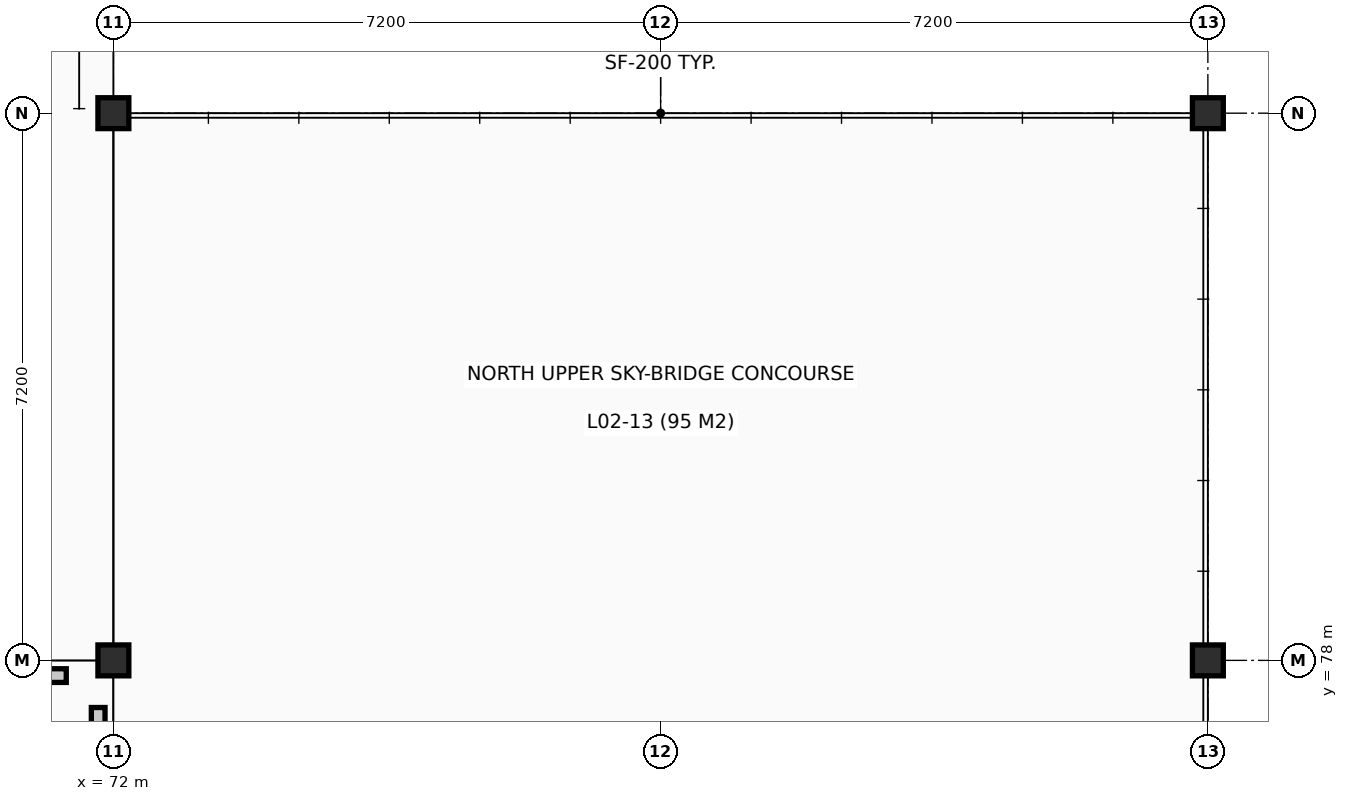
"""IFC4 building model, lengths in metres.
Left out: names, types, materials, properties, quantities, classifications, styles, units other than length and angle.
Written with IfcOpenShell. Run it as: python <this file> out.ifc"""

import sys

from ifc_helpers import new_model, si_unit, direction, frame, frame_2d, origin, origin_2d, place, context, subcontext, project, spatial, rectangle, hollow_circle, extrude, element, save


model = new_model("IFC4")
c1 = context("Model", 3, precision=1e-05, world=origin(), true_north=direction((0.0, 1.0)))
c2 = subcontext(c1, "Body", "Model", "MODEL_VIEW")
j1 = project(units=[si_unit("LENGTHUNIT", "METRE"), si_unit("PLANEANGLEUNIT", "RADIAN")], contexts=[c1])
p1 = place(None, origin())
s1 = spatial("IfcSite", under=j1, at=p1, CompositionType="ELEMENT")
p2 = place(p1, origin())
s2 = spatial("IfcBuilding", under=s1, at=p2, CompositionType="ELEMENT")
p3 = place(p2, frame((0.0, 0.0, 9.6)))
s3 = spatial("IfcBuildingStorey", under=s2, at=p3, CompositionType="ELEMENT", Elevation=9.6)
for number, where, z_axis, x_axis in (
    (1, (72.0, 78.0, 0.0), (0.0, 0.0, 1.0), (1.0, 0.0, 0.0)),
    (2, (72.0, 85.2, 0.0), (0.0, 0.0, 1.0), (1.0, 0.0, 0.0)),
    (3, (86.4, 78.0, 0.0), (0.0, 0.0, 1.0), (1.0, 0.0, 0.0)),
    (4, (86.4, 85.2, 0.0), (0.0, 0.0, 1.0), (1.0, 0.0, 0.0)),
):
    element("IfcColumn", number, at=place(p3, frame(where, z_axis=z_axis, x_axis=x_axis)), inside=s3, PredefinedType="COLUMN", context=c2, shape_type="SweptSolid", body=[
        extrude(hollow_circle(Radius=0.203, WallThickness=0.016, at=origin_2d()), origin(), (0.0, 0.0, 1.0), 4.8),
    ])
p4 = place(p3, frame((58.02, 77.8, 0.0), z_axis=(0.0, 0.0, 1.0), x_axis=(1.0, 0.0, 0.0)))
e5 = element("IfcWall", 5, at=p4, inside=s3, PredefinedType="PARTITIONING", context=c2, shape_type="SweptSolid", body=[
    extrude(rectangle(XDim=13.36, YDim=0.18, at=frame_2d((6.68, 0.0))), origin(), (0.0, 0.0, 1.0), 4.04),
])
p5 = place(p4, frame((7.955, 0.0, 0.0)))
e6 = element("IfcOpeningElement", 6, at=p5, cuts=e5, PredefinedType="OPENING", context=c2, shape_type="SweptSolid", body=[
    extrude(rectangle(XDim=1.25, YDim=2.15, at=frame_2d((0.625, 1.075))), frame((0.0, 0.1, 0.0), z_axis=(0.0, -1.0, 0.0), x_axis=(1.0, 0.0, 0.0)), (0.0, 0.0, 1.0), 0.2),
])
p6 = place(p3, frame((71.8, 57.42, 0.0), z_axis=(0.0, 0.0, 1.0), x_axis=(0.0, 1.0, 0.0)))
e7 = element("IfcWall", 7, at=p6, inside=s3, PredefinedType="PARTITIONING", context=c2, shape_type="SweptSolid", body=[
    extrude(rectangle(XDim=19.96, YDim=0.18, at=frame_2d((9.98, 0.0))), origin(), (0.0, 0.0, 1.0), 4.09),
])
save(model, sys.argv[1])
